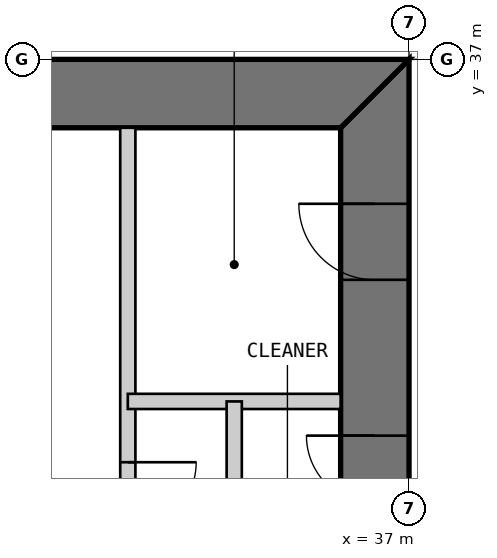
"""IFC4 building model, lengths in metres.
Left out: names, types, materials, properties, quantities, classifications, styles, units other than length and angle.
Written with IfcOpenShell. Run it as: python <this file> out.ifc"""

import sys

from ifc_helpers import new_model, si_unit, direction, frame, frame_2d, origin, place, context, subcontext, project, spatial, polyline, rectangle, outline, extrude, element, fill, save


model = new_model("IFC4")
c1 = context("Model", 3, precision=1e-05, world=origin(), true_north=direction((0.0, 1.0)))
c2 = subcontext(c1, "Body", "Model", "MODEL_VIEW")
j1 = project(units=[si_unit("LENGTHUNIT", "METRE"), si_unit("PLANEANGLEUNIT", "RADIAN")], contexts=[c1])
p1 = place(None, origin())
s1 = spatial("IfcSite", under=j1, at=p1, CompositionType="ELEMENT")
p2 = place(p1, origin())
s2 = spatial("IfcBuilding", under=s1, at=p2, CompositionType="ELEMENT")
p3 = place(p2, frame((0.0, 0.0, 239.8)))
s3 = spatial("IfcBuildingStorey", under=s2, at=p3, CompositionType="ELEMENT", Elevation=239.8)
p4 = place(p3, frame((36.55, 13.9, 0.0), z_axis=(0.0, 0.0, 1.0), x_axis=(0.0, 1.0, 0.0)))
e1 = element("IfcWall", 1, at=p4, inside=s3, PredefinedType="SHEAR", context=c2, shape_type="SweptSolid", body=[
    extrude(outline(polyline([(-0.9, -0.45), (23.1, -0.45), (22.2, 0.45), (0.0, 0.45), (-0.9, -0.45)])), origin(), (0.0, 0.0, 1.0), 6.0),
])
p5 = place(p4, frame((20.2, 0.0, 0.0)))
e2 = element("IfcOpeningElement", 2, at=p5, cuts=e1, PredefinedType="OPENING", context=c2, shape_type="SweptSolid", body=[
    extrude(rectangle(XDim=1.0, YDim=2.2, at=frame_2d((0.5, 1.1))), frame((0.0, 0.46, 0.0), z_axis=(0.0, -1.0, 0.0), x_axis=(1.0, 0.0, 0.0)), (0.0, 0.0, 1.0), 0.92),
])
p6 = place(p4, frame((17.25, 0.0, 0.0)))
e3 = element("IfcOpeningElement", 3, at=p6, cuts=e1, PredefinedType="OPENING", context=c2, shape_type="SweptSolid", body=[
    extrude(rectangle(XDim=0.9, YDim=2.2, at=frame_2d((0.45, 1.1))), frame((0.0, 0.46, 0.0), z_axis=(0.0, -1.0, 0.0), x_axis=(1.0, 0.0, 0.0)), (0.0, 0.0, 1.0), 0.92),
])
p7 = place(p3, frame((37.0, 36.55, 0.0), z_axis=(0.0, 0.0, 1.0), x_axis=(-1.0, 0.0, 0.0)))
e4 = element("IfcWall", 4, at=p7, inside=s3, PredefinedType="SHEAR", context=c2, shape_type="SweptSolid", body=[
    extrude(outline(polyline([(0.0, -0.45), (24.0, -0.45), (23.1, 0.45), (0.9, 0.45), (0.0, -0.45)])), origin(), (0.0, 0.0, 1.0), 6.0),
])
p8 = place(p7, frame((4.9, 0.0, 0.0)))
e5 = element("IfcOpeningElement", 5, at=p8, cuts=e4, PredefinedType="OPENING", context=c2, shape_type="SweptSolid", body=[
    extrude(rectangle(XDim=1.0, YDim=2.2, at=frame_2d((0.5, 1.1))), frame((0.0, 0.46, 0.0), z_axis=(0.0, -1.0, 0.0), x_axis=(1.0, 0.0, 0.0)), (0.0, 0.0, 1.0), 0.92),
])
p9 = place(p7, frame((8.9, 0.0, 0.0)))
e6 = element("IfcOpeningElement", 6, at=p9, cuts=e4, PredefinedType="OPENING", context=c2, shape_type="SweptSolid", body=[
    extrude(rectangle(XDim=1.1, YDim=2.2, at=frame_2d((0.55, 1.1))), frame((0.0, 0.46, 0.0), z_axis=(0.0, -1.0, 0.0), x_axis=(1.0, 0.0, 0.0)), (0.0, 0.0, 1.0), 0.92),
])
p10 = place(p7, frame((15.05, 0.0, 0.0)))
e7 = element("IfcOpeningElement", 7, at=p10, cuts=e4, PredefinedType="OPENING", context=c2, shape_type="SweptSolid", body=[
    extrude(rectangle(XDim=0.9, YDim=2.2, at=frame_2d((0.45, 1.1))), frame((0.0, 0.46, 0.0), z_axis=(0.0, -1.0, 0.0), x_axis=(1.0, 0.0, 0.0)), (0.0, 0.0, 1.0), 0.92),
])
p11 = place(p7, frame((17.9, 0.0, 0.0)))
e8 = element("IfcOpeningElement", 8, at=p11, cuts=e4, PredefinedType="OPENING", context=c2, shape_type="SweptSolid", body=[
    extrude(rectangle(XDim=1.0, YDim=2.2, at=frame_2d((0.5, 1.1))), frame((0.0, 0.46, 0.0), z_axis=(0.0, -1.0, 0.0), x_axis=(1.0, 0.0, 0.0)), (0.0, 0.0, 1.0), 0.92),
])
p12 = place(p7, frame((21.4, 0.0, 0.0)))
e9 = element("IfcOpeningElement", 9, at=p12, cuts=e4, PredefinedType="OPENING", context=c2, shape_type="SweptSolid", body=[
    extrude(rectangle(XDim=1.0, YDim=2.2, at=frame_2d((0.5, 1.1))), frame((0.0, 0.46, 0.0), z_axis=(0.0, -1.0, 0.0), x_axis=(1.0, 0.0, 0.0)), (0.0, 0.0, 1.0), 0.92),
])
p13 = place(p3, frame((33.3, 36.1, 0.0), z_axis=(0.0, 0.0, 1.0), x_axis=(0.0, -1.0, 0.0)))
e10 = element("IfcWall", 10, at=p13, inside=s3, PredefinedType="PARTITIONING", context=c2, shape_type="SweptSolid", body=[
    extrude(rectangle(XDim=16.1, YDim=0.2, at=frame_2d((8.05, 0.0))), origin(), (0.0, 0.0, 1.0), 5.8),
])
p14 = place(p13, frame((4.4, 0.0, 0.0)))
e11 = element("IfcOpeningElement", 11, at=p14, cuts=e10, PredefinedType="OPENING", context=c2, shape_type="SweptSolid", body=[
    extrude(rectangle(XDim=0.9, YDim=2.2, at=frame_2d((0.45, 1.1))), frame((0.0, 0.11, 0.0), z_axis=(0.0, -1.0, 0.0), x_axis=(1.0, 0.0, 0.0)), (0.0, 0.0, 1.0), 0.22),
])
p15 = place(p13, frame((7.217, 0.0, 0.0)))
e12 = element("IfcOpeningElement", 12, at=p15, cuts=e10, PredefinedType="OPENING", context=c2, shape_type="SweptSolid", body=[
    extrude(rectangle(XDim=1.1, YDim=2.2, at=frame_2d((0.55, 1.1))), frame((0.0, 0.11, 0.0), z_axis=(0.0, -1.0, 0.0), x_axis=(1.0, 0.0, 0.0)), (0.0, 0.0, 1.0), 0.22),
])
p16 = place(p13, frame((10.55, 0.0, 0.0)))
e13 = element("IfcOpeningElement", 13, at=p16, cuts=e10, PredefinedType="OPENING", context=c2, shape_type="SweptSolid", body=[
    extrude(rectangle(XDim=1.1, YDim=2.2, at=frame_2d((0.55, 1.1))), frame((0.0, 0.11, 0.0), z_axis=(0.0, -1.0, 0.0), x_axis=(1.0, 0.0, 0.0)), (0.0, 0.0, 1.0), 0.22),
])
p17 = place(p13, frame((13.883, 0.0, 0.0)))
e14 = element("IfcOpeningElement", 14, at=p17, cuts=e10, PredefinedType="OPENING", context=c2, shape_type="SweptSolid", body=[
    extrude(rectangle(XDim=1.1, YDim=2.2, at=frame_2d((0.55, 1.1))), frame((0.0, 0.11, 0.0), z_axis=(0.0, -1.0, 0.0), x_axis=(1.0, 0.0, 0.0)), (0.0, 0.0, 1.0), 0.22),
])
p18 = place(p3, frame((36.1, 32.5, 0.0), z_axis=(0.0, 0.0, 1.0), x_axis=(-1.0, 0.0, 0.0)))
e15 = element("IfcWall", 15, at=p18, inside=s3, PredefinedType="PARTITIONING", context=c2, shape_type="SweptSolid", body=[
    extrude(rectangle(XDim=2.8, YDim=0.2, at=frame_2d((1.4, 0.0))), origin(), (0.0, 0.0, 1.0), 5.8),
])
p19 = place(p3, frame((34.7, 32.5, 0.0), z_axis=(0.0, 0.0, 1.0), x_axis=(0.0, -1.0, 0.0)))
e16 = element("IfcWall", 16, at=p19, inside=s3, PredefinedType="PARTITIONING", context=c2, shape_type="SweptSolid", body=[
    extrude(rectangle(XDim=2.5, YDim=0.2, at=frame_2d((1.25, 0.0))), origin(), (0.0, 0.0, 1.0), 5.8),
])
p20 = place(p5, origin())
e17 = element("IfcDoor", 17, at=p20, inside=s3, OperationType="SINGLE_SWING_RIGHT", PredefinedType="DOOR", context=c2, shape_type="SweptSolid", body=[
    extrude(rectangle(XDim=1.0, YDim=2.2, at=frame_2d((0.5, 1.1))), frame((0.0, 0.025, 0.0), z_axis=(0.0, -1.0, 0.0), x_axis=(1.0, 0.0, 0.0)), (0.0, 0.0, 1.0), 0.05),
    extrude(outline(polyline([(0.0, 0.0), (0.04, 0.0), (0.04, 2.16), (0.96, 2.16), (0.96, 0.0), (1.0, 0.0), (1.0, 2.2), (0.0, 2.2), (0.0, 0.0)])), frame((0.0, 0.3, 0.0), z_axis=(0.0, -1.0, 0.0), x_axis=(1.0, 0.0, 0.0)), (0.0, 0.0, 1.0), 0.6),
])
fill(e2, e17)
p21 = place(p14, origin())
e18 = element("IfcDoor", 18, at=p21, inside=s3, OperationType="SINGLE_SWING_LEFT", PredefinedType="DOOR", context=c2, shape_type="SweptSolid", body=[
    extrude(rectangle(XDim=0.9, YDim=2.2, at=frame_2d((0.45, 1.1))), frame((0.0, 0.025, 0.0), z_axis=(0.0, -1.0, 0.0), x_axis=(1.0, 0.0, 0.0)), (0.0, 0.0, 1.0), 0.05),
])
fill(e11, e18)
p22 = place(p6, origin())
e19 = element("IfcDoor", 19, at=p22, inside=s3, OperationType="SINGLE_SWING_RIGHT", PredefinedType="DOOR", context=c2, shape_type="SweptSolid", body=[
    extrude(rectangle(XDim=0.9, YDim=2.2, at=frame_2d((0.45, 1.1))), frame((0.0, 0.025, 0.0), z_axis=(0.0, -1.0, 0.0), x_axis=(1.0, 0.0, 0.0)), (0.0, 0.0, 1.0), 0.05),
    extrude(outline(polyline([(0.0, 0.0), (0.04, 0.0), (0.04, 2.16), (0.86, 2.16), (0.86, 0.0), (0.9, 0.0), (0.9, 2.2), (0.0, 2.2), (0.0, 0.0)])), frame((0.0, 0.3, 0.0), z_axis=(0.0, -1.0, 0.0), x_axis=(1.0, 0.0, 0.0)), (0.0, 0.0, 1.0), 0.6),
])
fill(e3, e19)
save(model, sys.argv[1])
